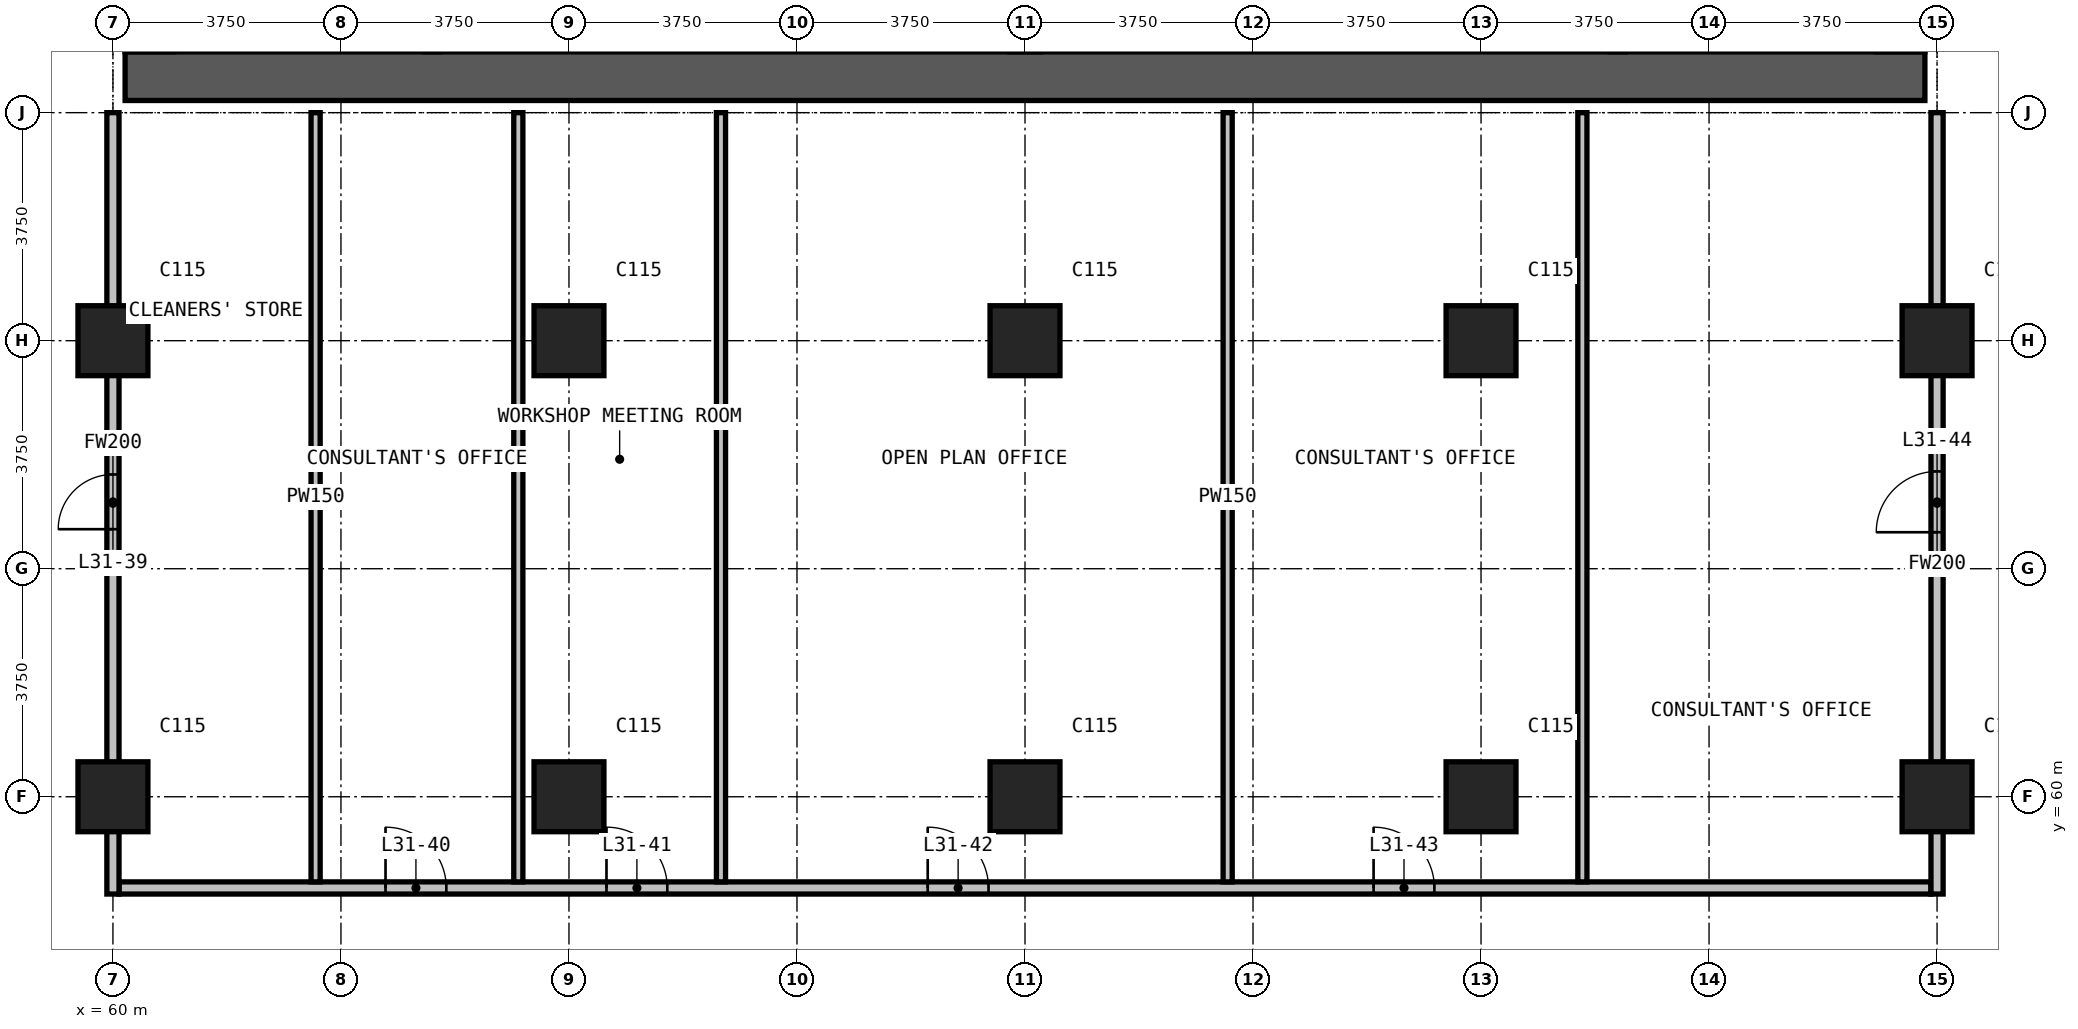
"""IFC4 building model, lengths in metres.
Left out: names, types, materials, properties, quantities, classifications, styles, units other than length and angle.
Written with IfcOpenShell. Run it as: python <this file> out.ifc"""

import sys

from ifc_helpers import new_model, si_unit, direction, frame, frame_2d, origin, origin_2d, place, context, subcontext, project, spatial, rectangle, extrude, element, fill, save


model = new_model("IFC4")
c1 = context("Model", 3, precision=1e-05, world=origin(), true_north=direction((0.0, 1.0)))
c2 = subcontext(c1, "Body", "Model", "MODEL_VIEW")
j1 = project(units=[si_unit("LENGTHUNIT", "METRE"), si_unit("PLANEANGLEUNIT", "RADIAN")], contexts=[c1])
p1 = place(None, origin())
s1 = spatial("IfcSite", under=j1, at=p1, CompositionType="ELEMENT")
p2 = place(p1, origin())
s2 = spatial("IfcBuilding", under=s1, at=p2, CompositionType="ELEMENT")
p3 = place(p2, frame((0.0, 0.0, 125.2)))
s3 = spatial("IfcBuildingStorey", under=s2, at=p3, CompositionType="ELEMENT", Elevation=125.2)
for number, where, z_axis, x_axis in (
    (1, (60.0, 60.0, 0.0), (0.0, 0.0, 1.0), (1.0, 0.0, 0.0)),
    (2, (60.0, 67.5, 0.0), (0.0, 0.0, 1.0), (1.0, 0.0, 0.0)),
    (3, (67.5, 60.0, 0.0), (0.0, 0.0, 1.0), (1.0, 0.0, 0.0)),
    (4, (67.5, 67.5, 0.0), (0.0, 0.0, 1.0), (1.0, 0.0, 0.0)),
    (5, (75.0, 60.0, 0.0), (0.0, 0.0, 1.0), (1.0, 0.0, 0.0)),
    (6, (75.0, 67.5, 0.0), (0.0, 0.0, 1.0), (1.0, 0.0, 0.0)),
    (7, (82.5, 60.0, 0.0), (0.0, 0.0, 1.0), (1.0, 0.0, 0.0)),
    (8, (82.5, 67.5, 0.0), (0.0, 0.0, 1.0), (1.0, 0.0, 0.0)),
    (9, (90.0, 60.0, 0.0), (0.0, 0.0, 1.0), (1.0, 0.0, 0.0)),
    (10, (90.0, 67.5, 0.0), (0.0, 0.0, 1.0), (1.0, 0.0, 0.0)),
):
    element("IfcColumn", number, at=place(p3, frame(where, z_axis=z_axis, x_axis=x_axis)), inside=s3, PredefinedType="COLUMN", context=c2, shape_type="SweptSolid", body=[
        extrude(rectangle(XDim=1.15, YDim=1.15, at=origin_2d()), origin(), (0.0, 0.0, 1.0), 3.6),
    ])
p4 = place(p3, frame((60.2, 71.85, 0.0), z_axis=(0.0, 0.0, 1.0), x_axis=(1.0, 0.0, 0.0)))
e11 = element("IfcWall", 11, at=p4, inside=s3, PredefinedType="SHEAR", context=c2, shape_type="SweptSolid", body=[
    extrude(rectangle(XDim=29.6, YDim=0.8, at=frame_2d((14.8, 0.0))), origin(), (0.0, 0.0, 1.0), 3.6),
])
p5 = place(p3, frame((60.1, 58.5, 0.0), z_axis=(0.0, 0.0, 1.0), x_axis=(1.0, 0.0, 0.0)))
e12 = element("IfcWall", 12, at=p5, inside=s3, PredefinedType="PARTITIONING", context=c2, shape_type="SweptSolid", body=[
    extrude(rectangle(XDim=29.8, YDim=0.2, at=frame_2d((14.9, 0.0))), origin(), (0.0, 0.0, 1.0), 3.3),
])
p6 = place(p5, frame((4.383, 0.0, 0.0)))
e13 = element("IfcOpeningElement", 13, at=p6, cuts=e12, PredefinedType="OPENING", context=c2, shape_type="SweptSolid", body=[
    extrude(rectangle(XDim=1.0, YDim=2.2, at=frame_2d((0.5, 1.1))), frame((0.0, 0.11, 0.0), z_axis=(0.0, -1.0, 0.0), x_axis=(1.0, 0.0, 0.0)), (0.0, 0.0, 1.0), 0.22),
])
p7 = place(p5, frame((8.017, 0.0, 0.0)))
e14 = element("IfcOpeningElement", 14, at=p7, cuts=e12, PredefinedType="OPENING", context=c2, shape_type="SweptSolid", body=[
    extrude(rectangle(XDim=1.0, YDim=2.2, at=frame_2d((0.5, 1.1))), frame((0.0, 0.11, 0.0), z_axis=(0.0, -1.0, 0.0), x_axis=(1.0, 0.0, 0.0)), (0.0, 0.0, 1.0), 0.22),
])
p8 = place(p5, frame((13.3, 0.0, 0.0)))
e15 = element("IfcOpeningElement", 15, at=p8, cuts=e12, PredefinedType="OPENING", context=c2, shape_type="SweptSolid", body=[
    extrude(rectangle(XDim=1.0, YDim=2.2, at=frame_2d((0.5, 1.1))), frame((0.0, 0.11, 0.0), z_axis=(0.0, -1.0, 0.0), x_axis=(1.0, 0.0, 0.0)), (0.0, 0.0, 1.0), 0.22),
])
p9 = place(p5, frame((20.633, 0.0, 0.0)))
e16 = element("IfcOpeningElement", 16, at=p9, cuts=e12, PredefinedType="OPENING", context=c2, shape_type="SweptSolid", body=[
    extrude(rectangle(XDim=1.0, YDim=2.2, at=frame_2d((0.5, 1.1))), frame((0.0, 0.11, 0.0), z_axis=(0.0, -1.0, 0.0), x_axis=(1.0, 0.0, 0.0)), (0.0, 0.0, 1.0), 0.22),
])
p10 = place(p3, frame((60.0, 58.4, 0.0), z_axis=(0.0, 0.0, 1.0), x_axis=(0.0, 1.0, 0.0)))
e17 = element("IfcWall", 17, at=p10, inside=s3, PredefinedType="PARTITIONING", context=c2, shape_type="SweptSolid", body=[
    extrude(rectangle(XDim=12.85, YDim=0.2, at=frame_2d((6.425, 0.0))), origin(), (0.0, 0.0, 1.0), 3.3),
])
p11 = place(p10, frame((6.0, 0.0, 0.0)))
e18 = element("IfcOpeningElement", 18, at=p11, cuts=e17, PredefinedType="OPENING", context=c2, shape_type="SweptSolid", body=[
    extrude(rectangle(XDim=0.9, YDim=2.2, at=frame_2d((0.45, 1.1))), frame((0.0, 0.11, 0.0), z_axis=(0.0, -1.0, 0.0), x_axis=(1.0, 0.0, 0.0)), (0.0, 0.0, 1.0), 0.22),
])
p12 = place(p3, frame((90.0, 58.4, 0.0), z_axis=(0.0, 0.0, 1.0), x_axis=(0.0, 1.0, 0.0)))
e19 = element("IfcWall", 19, at=p12, inside=s3, PredefinedType="PARTITIONING", context=c2, shape_type="SweptSolid", body=[
    extrude(rectangle(XDim=12.85, YDim=0.2, at=frame_2d((6.425, 0.0))), origin(), (0.0, 0.0, 1.0), 3.3),
])
p13 = place(p12, frame((5.95, 0.0, 0.0)))
e20 = element("IfcOpeningElement", 20, at=p13, cuts=e19, PredefinedType="OPENING", context=c2, shape_type="SweptSolid", body=[
    extrude(rectangle(XDim=1.0, YDim=2.2, at=frame_2d((0.5, 1.1))), frame((0.0, 0.11, 0.0), z_axis=(0.0, -1.0, 0.0), x_axis=(1.0, 0.0, 0.0)), (0.0, 0.0, 1.0), 0.22),
])
for number, where, z_axis, x_axis in (
    (21, (63.333, 58.6, 0.0), (0.0, 0.0, 1.0), (0.0, 1.0, 0.0)),
    (22, (66.667, 58.6, 0.0), (0.0, 0.0, 1.0), (0.0, 1.0, 0.0)),
    (23, (70.0, 58.6, 0.0), (0.0, 0.0, 1.0), (0.0, 1.0, 0.0)),
    (24, (78.333, 58.6, 0.0), (0.0, 0.0, 1.0), (0.0, 1.0, 0.0)),
    (25, (84.167, 58.6, 0.0), (0.0, 0.0, 1.0), (0.0, 1.0, 0.0)),
):
    element("IfcWall", number, at=place(p3, frame(where, z_axis=z_axis, x_axis=x_axis)), inside=s3, PredefinedType="PARTITIONING", context=c2, shape_type="SweptSolid", body=[
        extrude(rectangle(XDim=12.65, YDim=0.15, at=frame_2d((6.325, 0.0))), origin(), (0.0, 0.0, 1.0), 3.3),
    ])
p14 = place(p11, origin())
e26 = element("IfcDoor", 26, at=p14, inside=s3, OperationType="SINGLE_SWING_LEFT", PredefinedType="DOOR", context=c2, shape_type="SweptSolid", body=[
    extrude(rectangle(XDim=0.9, YDim=2.2, at=frame_2d((0.45, 1.1))), frame((0.0, 0.025, 0.0), z_axis=(0.0, -1.0, 0.0), x_axis=(1.0, 0.0, 0.0)), (0.0, 0.0, 1.0), 0.05),
])
fill(e18, e26)
p15 = place(p6, origin())
e27 = element("IfcDoor", 27, at=p15, inside=s3, OperationType="SINGLE_SWING_LEFT", PredefinedType="DOOR", context=c2, shape_type="SweptSolid", body=[
    extrude(rectangle(XDim=1.0, YDim=2.2, at=frame_2d((0.5, 1.1))), frame((0.0, 0.025, 0.0), z_axis=(0.0, -1.0, 0.0), x_axis=(1.0, 0.0, 0.0)), (0.0, 0.0, 1.0), 0.05),
])
fill(e13, e27)
p16 = place(p7, origin())
e28 = element("IfcDoor", 28, at=p16, inside=s3, OperationType="SINGLE_SWING_RIGHT", PredefinedType="DOOR", context=c2, shape_type="SweptSolid", body=[
    extrude(rectangle(XDim=1.0, YDim=2.2, at=frame_2d((0.5, 1.1))), frame((0.0, 0.025, 0.0), z_axis=(0.0, -1.0, 0.0), x_axis=(1.0, 0.0, 0.0)), (0.0, 0.0, 1.0), 0.05),
])
fill(e14, e28)
p17 = place(p8, origin())
e29 = element("IfcDoor", 29, at=p17, inside=s3, OperationType="SINGLE_SWING_LEFT", PredefinedType="DOOR", context=c2, shape_type="SweptSolid", body=[
    extrude(rectangle(XDim=1.0, YDim=2.2, at=frame_2d((0.5, 1.1))), frame((0.0, 0.025, 0.0), z_axis=(0.0, -1.0, 0.0), x_axis=(1.0, 0.0, 0.0)), (0.0, 0.0, 1.0), 0.05),
])
fill(e15, e29)
p18 = place(p9, origin())
e30 = element("IfcDoor", 30, at=p18, inside=s3, OperationType="SINGLE_SWING_LEFT", PredefinedType="DOOR", context=c2, shape_type="SweptSolid", body=[
    extrude(rectangle(XDim=1.0, YDim=2.2, at=frame_2d((0.5, 1.1))), frame((0.0, 0.025, 0.0), z_axis=(0.0, -1.0, 0.0), x_axis=(1.0, 0.0, 0.0)), (0.0, 0.0, 1.0), 0.05),
])
fill(e16, e30)
p19 = place(p13, origin())
e31 = element("IfcDoor", 31, at=p19, inside=s3, OperationType="SINGLE_SWING_LEFT", PredefinedType="DOOR", context=c2, shape_type="SweptSolid", body=[
    extrude(rectangle(XDim=1.0, YDim=2.2, at=frame_2d((0.5, 1.1))), frame((0.0, 0.025, 0.0), z_axis=(0.0, -1.0, 0.0), x_axis=(1.0, 0.0, 0.0)), (0.0, 0.0, 1.0), 0.05),
])
fill(e20, e31)
save(model, sys.argv[1])
